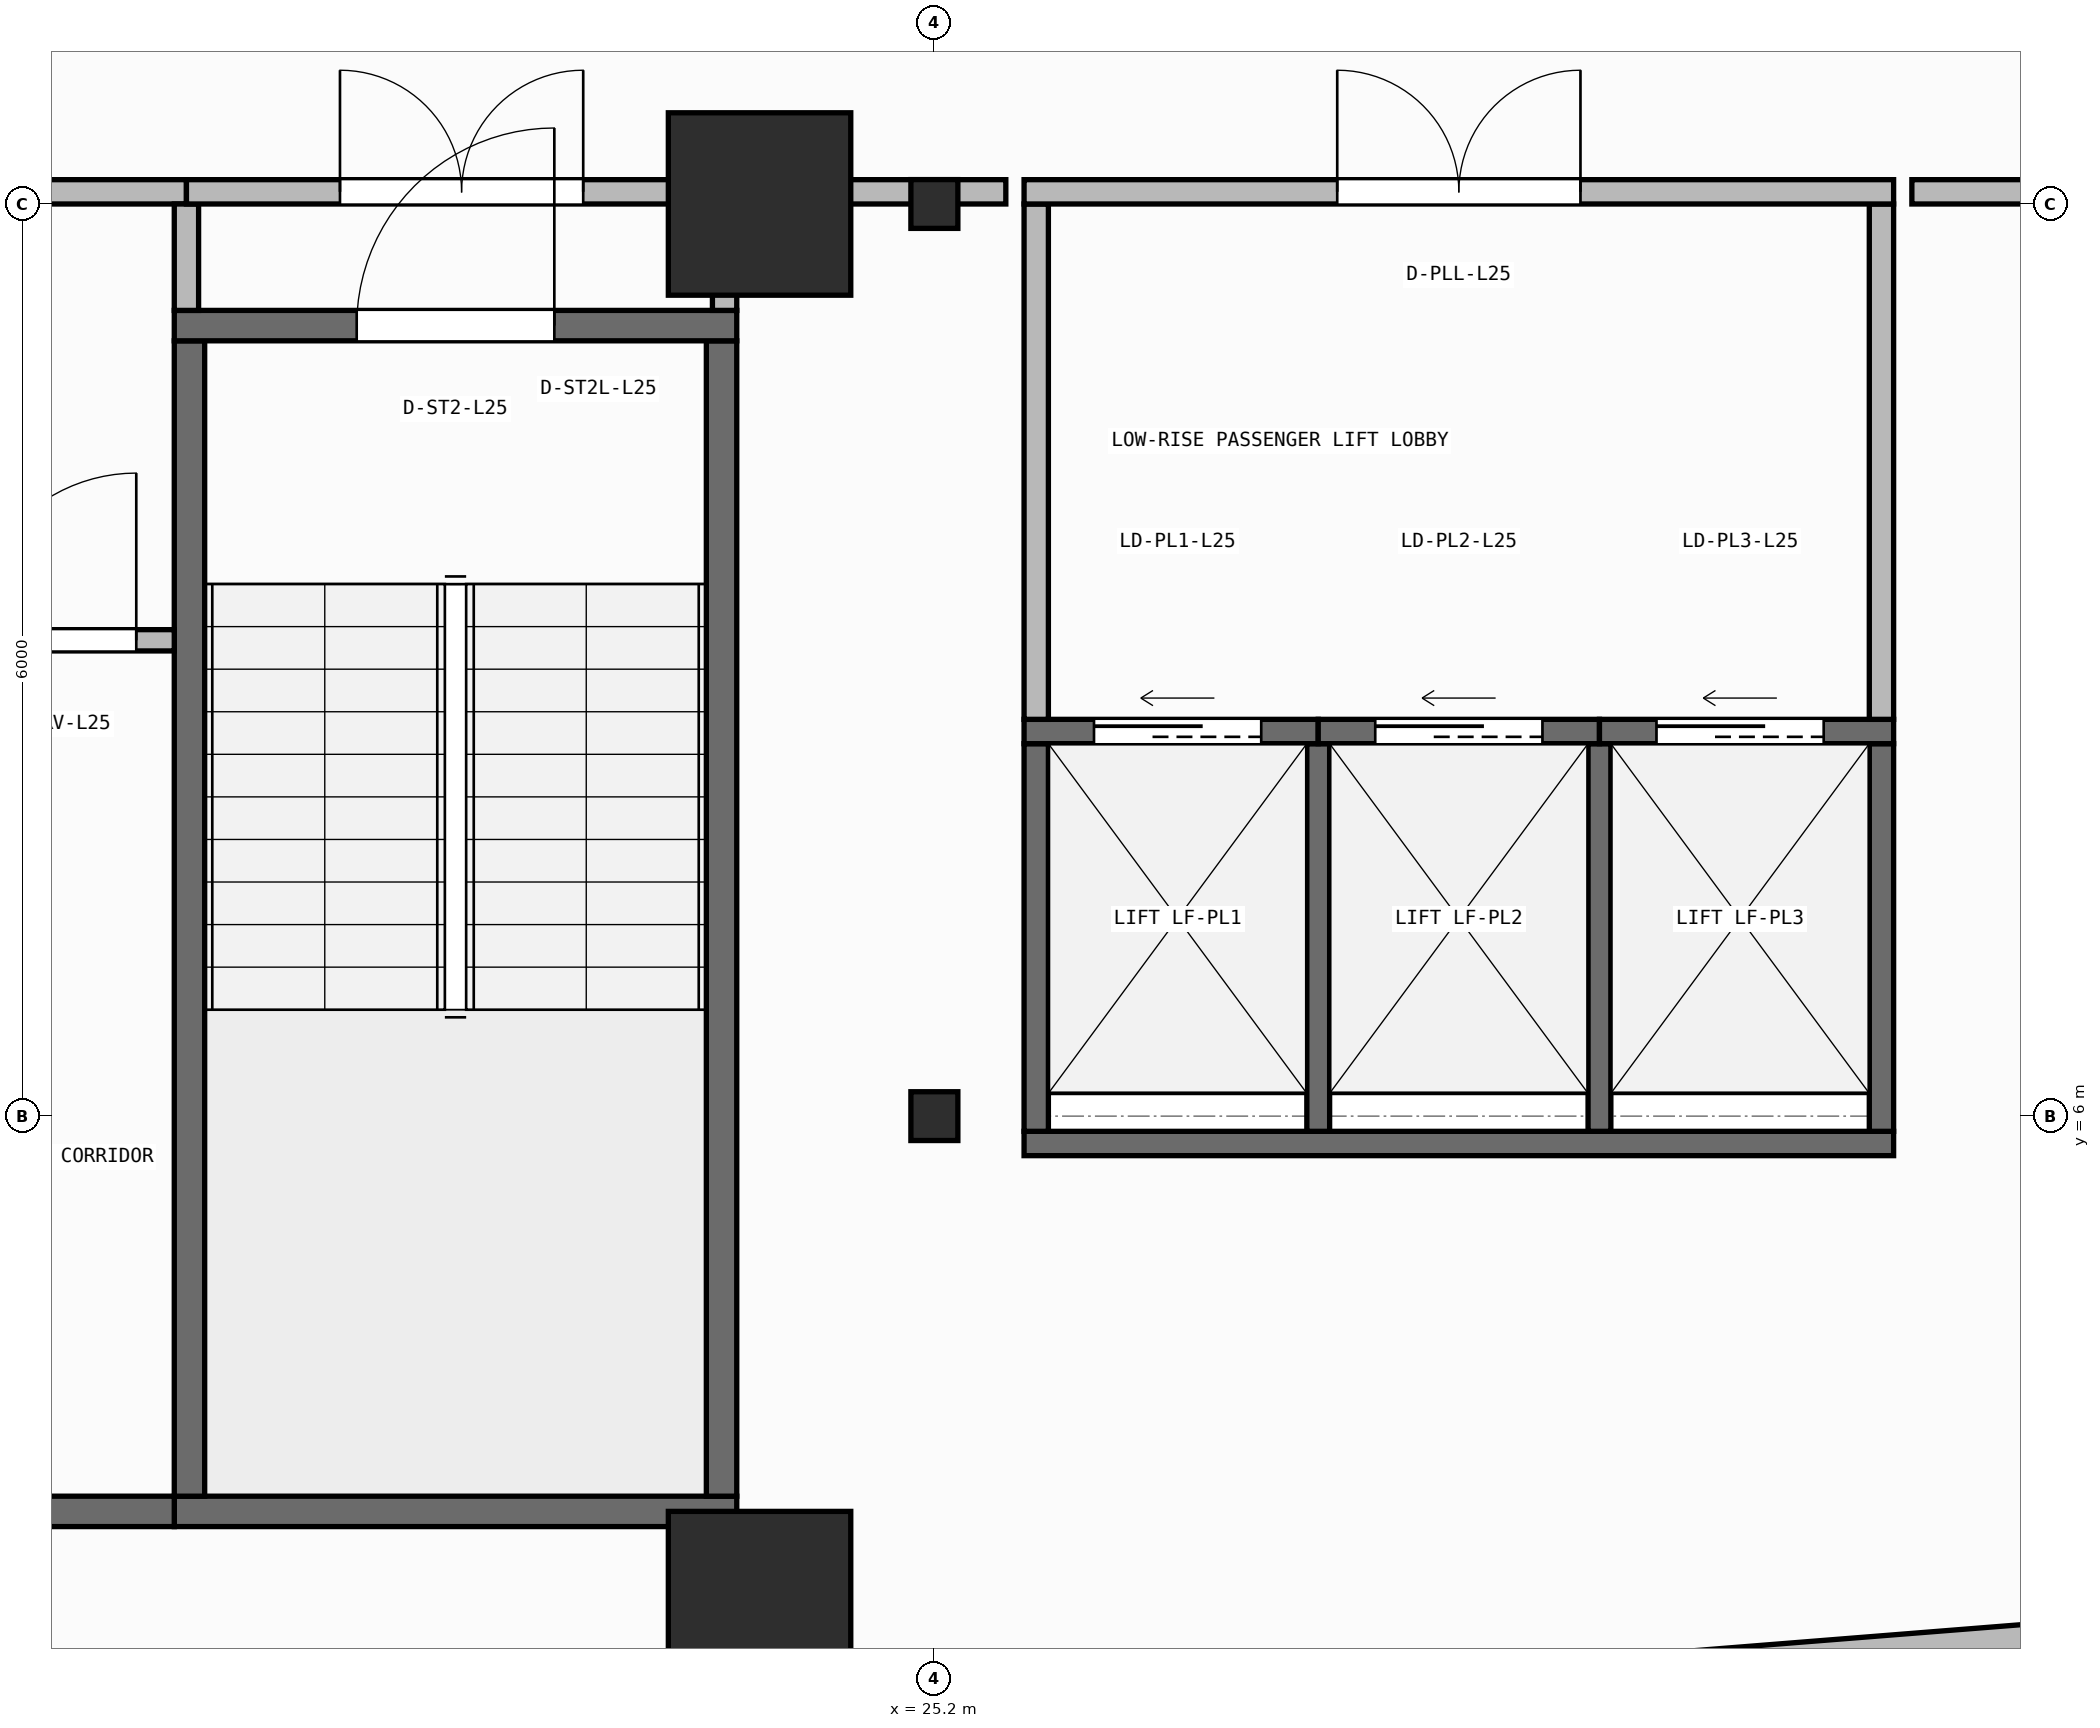
"""IFC4 building model, lengths in metres.
Left out: names, types, materials, properties, quantities, classifications, styles, units other than length and angle.
Written with IfcOpenShell. Run it as: python <this file> out.ifc"""

import sys

from ifc_helpers import new_model, si_unit, direction, frame, frame_2d, origin, origin_2d, place, context, subcontext, project, spatial, rectangle, i_section, extrude, element, fill, save


model = new_model("IFC4")
c1 = context("Model", 3, precision=1e-05, world=origin(), true_north=direction((0.0, 1.0)))
c2 = subcontext(c1, "Body", "Model", "MODEL_VIEW")
j1 = project(units=[si_unit("LENGTHUNIT", "METRE"), si_unit("PLANEANGLEUNIT", "RADIAN")], contexts=[c1])
p1 = place(None, origin())
s1 = spatial("IfcSite", under=j1, at=p1, CompositionType="ELEMENT")
p2 = place(p1, origin())
s2 = spatial("IfcBuilding", under=s1, at=p2, CompositionType="ELEMENT")
p3 = place(p2, frame((0.0, 0.0, 97.55)))
s3 = spatial("IfcBuildingStorey", under=s2, at=p3, CompositionType="ELEMENT", Elevation=97.55)
p4 = place(p3, frame((24.05, 2.8, 0.0), z_axis=(0.0, 0.0, 1.0), x_axis=(1.0, 0.0, 0.0)))
e1 = element("IfcColumn", 1, at=p4, inside=s3, PredefinedType="COLUMN", context=c2, shape_type="SweptSolid", body=[
    extrude(rectangle(XDim=1.4, YDim=1.4, at=origin_2d()), origin(), (0.0, 0.0, 1.0), 5.8),
])
p5 = place(p3, frame((25.2, 6.0, 0.0), z_axis=(0.0, 0.0, 1.0), x_axis=(1.0, 0.0, 0.0)))
e2 = element("IfcColumn", 2, at=p5, inside=s3, PredefinedType="COLUMN", context=c2, shape_type="SweptSolid", body=[
    extrude(i_section(OverallWidth=0.311, OverallDepth=0.327, WebThickness=0.016, FlangeThickness=0.025, FilletRadius=0.017, at=origin_2d()), origin(), (0.0, 0.0, 1.0), 5.8),
])
p6 = place(p3, frame((24.05, 12.0, 0.0), z_axis=(0.0, 0.0, 1.0), x_axis=(1.0, 0.0, 0.0)))
e3 = element("IfcColumn", 3, at=p6, inside=s3, PredefinedType="COLUMN", context=c2, shape_type="SweptSolid", body=[
    extrude(rectangle(XDim=1.4, YDim=1.4, at=origin_2d()), origin(), (0.0, 0.0, 1.0), 5.8),
])
p7 = place(p3, frame((25.2, 12.0, 0.0), z_axis=(0.0, 0.0, 1.0), x_axis=(1.0, 0.0, 0.0)))
e4 = element("IfcColumn", 4, at=p7, inside=s3, PredefinedType="COLUMN", context=c2, shape_type="SweptSolid", body=[
    extrude(i_section(OverallWidth=0.311, OverallDepth=0.327, WebThickness=0.016, FlangeThickness=0.025, FilletRadius=0.017, at=origin_2d()), origin(), (0.0, 0.0, 1.0), 5.8),
])
p8 = place(p3, frame((20.2, 3.4, 0.0), z_axis=(0.0, 0.0, 1.0), x_axis=(1.0, 0.0, 0.0)))
e5 = element("IfcWall", 5, at=p8, inside=s3, PredefinedType="SHEAR", context=c2, shape_type="SweptSolid", body=[
    extrude(rectangle(XDim=3.7, YDim=0.2, at=frame_2d((1.85, 0.0))), origin(), (0.0, 0.0, 1.0), 5.56),
])
for number, where, z_axis, x_axis in (
    (6, (20.3, 3.5, 0.0), (0.0, 0.0, 1.0), (0.0, 1.0, 0.0)),
    (7, (23.8, 3.5, 0.0), (0.0, 0.0, 1.0), (0.0, 1.0, 0.0)),
):
    element("IfcWall", number, at=place(p3, frame(where, z_axis=z_axis, x_axis=x_axis)), inside=s3, PredefinedType="SHEAR", context=c2, shape_type="SweptSolid", body=[
        extrude(rectangle(XDim=7.6, YDim=0.2, at=frame_2d((3.8, 0.0))), origin(), (0.0, 0.0, 1.0), 5.56),
    ])
p9 = place(p3, frame((20.2, 11.2, 0.0), z_axis=(0.0, 0.0, 1.0), x_axis=(1.0, 0.0, 0.0)))
e8 = element("IfcWall", 8, at=p9, inside=s3, PredefinedType="SHEAR", context=c2, shape_type="SweptSolid", body=[
    extrude(rectangle(XDim=3.7, YDim=0.2, at=frame_2d((1.85, 0.0))), origin(), (0.0, 0.0, 1.0), 5.56),
])
p10 = place(p9, frame((1.2, 0.0, 0.0)))
e9 = element("IfcOpeningElement", 9, at=p10, cuts=e8, PredefinedType="OPENING", context=c2, shape_type="SweptSolid", body=[
    extrude(rectangle(XDim=1.3, YDim=2.15, at=frame_2d((0.65, 1.075))), frame((0.0, 0.11, 0.0), z_axis=(0.0, -1.0, 0.0), x_axis=(1.0, 0.0, 0.0)), (0.0, 0.0, 1.0), 0.22),
])
p11 = place(p3, frame((6.5, 3.4, 0.0), z_axis=(0.0, 0.0, 1.0), x_axis=(1.0, 0.0, 0.0)))
e10 = element("IfcWall", 10, at=p11, inside=s3, PredefinedType="SHEAR", context=c2, shape_type="SweptSolid", body=[
    extrude(rectangle(XDim=13.7, YDim=0.2, at=frame_2d((6.85, 0.0))), origin(), (0.0, 0.0, 1.0), 5.56),
])
p12 = place(p3, frame((25.79, 5.82, 0.0), z_axis=(0.0, 0.0, 1.0), x_axis=(1.0, 0.0, 0.0)))
e11 = element("IfcWall", 11, at=p12, inside=s3, PredefinedType="SHEAR", context=c2, shape_type="SweptSolid", body=[
    extrude(rectangle(XDim=5.72, YDim=0.16, at=frame_2d((2.86, 0.0))), origin(), (0.0, 0.0, 1.0), 5.56),
])
for number, where, z_axis, x_axis in (
    (12, (25.87, 5.9, 0.0), (0.0, 0.0, 1.0), (0.0, 1.0, 0.0)),
    (13, (31.43, 5.9, 0.0), (0.0, 0.0, 1.0), (0.0, 1.0, 0.0)),
):
    element("IfcWall", number, at=place(p3, frame(where, z_axis=z_axis, x_axis=x_axis)), inside=s3, PredefinedType="SHEAR", context=c2, shape_type="SweptSolid", body=[
        extrude(rectangle(XDim=2.55, YDim=0.16, at=frame_2d((1.275, 0.0))), origin(), (0.0, 0.0, 1.0), 5.56),
    ])
for number, where, z_axis, x_axis in (
    (14, (27.725, 5.9, 0.0), (0.0, 0.0, 1.0), (0.0, 1.0, 0.0)),
    (15, (29.575, 5.9, 0.0), (0.0, 0.0, 1.0), (0.0, 1.0, 0.0)),
):
    element("IfcWall", number, at=place(p3, frame(where, z_axis=z_axis, x_axis=x_axis)), inside=s3, PredefinedType="SHEAR", context=c2, shape_type="SweptSolid", body=[
        extrude(rectangle(XDim=2.55, YDim=0.15, at=frame_2d((1.275, 0.0))), origin(), (0.0, 0.0, 1.0), 5.56),
    ])
p13 = place(p3, frame((25.79, 8.53, 0.0), z_axis=(0.0, 0.0, 1.0), x_axis=(1.0, 0.0, 0.0)))
e16 = element("IfcWall", 16, at=p13, inside=s3, PredefinedType="SHEAR", context=c2, shape_type="SweptSolid", body=[
    extrude(rectangle(XDim=1.935, YDim=0.16, at=frame_2d((0.968, 0.0))), origin(), (0.0, 0.0, 1.0), 5.56),
])
p14 = place(p13, frame((0.46, 0.0, 0.0)))
e17 = element("IfcOpeningElement", 17, at=p14, cuts=e16, PredefinedType="OPENING", context=c2, shape_type="SweptSolid", body=[
    extrude(rectangle(XDim=1.1, YDim=2.15, at=frame_2d((0.55, 1.075))), frame((0.0, 0.09, 0.0), z_axis=(0.0, -1.0, 0.0), x_axis=(1.0, 0.0, 0.0)), (0.0, 0.0, 1.0), 0.18),
])
p15 = place(p3, frame((27.725, 8.53, 0.0), z_axis=(0.0, 0.0, 1.0), x_axis=(1.0, 0.0, 0.0)))
e18 = element("IfcWall", 18, at=p15, inside=s3, PredefinedType="SHEAR", context=c2, shape_type="SweptSolid", body=[
    extrude(rectangle(XDim=1.85, YDim=0.16, at=frame_2d((0.925, 0.0))), origin(), (0.0, 0.0, 1.0), 5.56),
])
p16 = place(p15, frame((0.375, 0.0, 0.0)))
e19 = element("IfcOpeningElement", 19, at=p16, cuts=e18, PredefinedType="OPENING", context=c2, shape_type="SweptSolid", body=[
    extrude(rectangle(XDim=1.1, YDim=2.15, at=frame_2d((0.55, 1.075))), frame((0.0, 0.09, 0.0), z_axis=(0.0, -1.0, 0.0), x_axis=(1.0, 0.0, 0.0)), (0.0, 0.0, 1.0), 0.18),
])
p17 = place(p3, frame((29.575, 8.53, 0.0), z_axis=(0.0, 0.0, 1.0), x_axis=(1.0, 0.0, 0.0)))
e20 = element("IfcWall", 20, at=p17, inside=s3, PredefinedType="SHEAR", context=c2, shape_type="SweptSolid", body=[
    extrude(rectangle(XDim=1.935, YDim=0.16, at=frame_2d((0.968, 0.0))), origin(), (0.0, 0.0, 1.0), 5.56),
])
p18 = place(p17, frame((0.375, 0.0, 0.0)))
e21 = element("IfcOpeningElement", 21, at=p18, cuts=e20, PredefinedType="OPENING", context=c2, shape_type="SweptSolid", body=[
    extrude(rectangle(XDim=1.1, YDim=2.15, at=frame_2d((0.55, 1.075))), frame((0.0, 0.09, 0.0), z_axis=(0.0, -1.0, 0.0), x_axis=(1.0, 0.0, 0.0)), (0.0, 0.0, 1.0), 0.18),
])
p19 = place(p3, frame((18.61, 9.13, 0.0), z_axis=(0.0, 0.0, 1.0), x_axis=(1.0, 0.0, 0.0)))
e22 = element("IfcWall", 22, at=p19, inside=s3, PredefinedType="PARTITIONING", context=c2, shape_type="SweptSolid", body=[
    extrude(rectangle(XDim=1.59, YDim=0.14, at=frame_2d((0.795, 0.0))), origin(), (0.0, 0.0, 1.0), 5.56),
])
p20 = place(p19, frame((0.24, 0.0, 0.0)))
e23 = element("IfcOpeningElement", 23, at=p20, cuts=e22, PredefinedType="OPENING", context=c2, shape_type="SweptSolid", body=[
    extrude(rectangle(XDim=1.1, YDim=2.1, at=frame_2d((0.55, 1.05))), frame((0.0, 0.08, 0.0), z_axis=(0.0, -1.0, 0.0), x_axis=(1.0, 0.0, 0.0)), (0.0, 0.0, 1.0), 0.16),
])
p21 = place(p3, frame((12.58, 12.08, 0.0), z_axis=(0.0, 0.0, 1.0), x_axis=(1.0, 0.0, 0.0)))
e24 = element("IfcWall", 24, at=p21, inside=s3, PredefinedType="PARTITIONING", context=c2, shape_type="SweptSolid", body=[
    extrude(rectangle(XDim=7.7, YDim=0.16, at=frame_2d((3.85, 0.0))), origin(), (0.0, 0.0, 1.0), 4.835),
])
p22 = place(p21, frame((3.05, 0.0, 0.0)))
e25 = element("IfcOpeningElement", 25, at=p22, cuts=e24, PredefinedType="OPENING", context=c2, shape_type="SweptSolid", body=[
    extrude(rectangle(XDim=1.6, YDim=2.05, at=frame_2d((0.8, 1.025))), frame((0.0, 0.09, 0.0), z_axis=(0.0, -1.0, 0.0), x_axis=(1.0, 0.0, 0.0)), (0.0, 0.0, 1.0), 0.18),
])
p23 = place(p3, frame((20.28, 11.3, 0.0), z_axis=(0.0, 0.0, 1.0), x_axis=(0.0, 1.0, 0.0)))
e26 = element("IfcWall", 26, at=p23, inside=s3, PredefinedType="PARTITIONING", context=c2, shape_type="SweptSolid", body=[
    extrude(rectangle(XDim=0.7, YDim=0.16, at=frame_2d((0.35, 0.0))), origin(), (0.0, 0.0, 1.0), 5.56),
])
p24 = place(p3, frame((20.28, 12.08, 0.0), z_axis=(0.0, 0.0, 1.0), x_axis=(1.0, 0.0, 0.0)))
e27 = element("IfcWall", 27, at=p24, inside=s3, PredefinedType="PARTITIONING", context=c2, shape_type="SweptSolid", body=[
    extrude(rectangle(XDim=3.62, YDim=0.16, at=frame_2d((1.81, 0.0))), origin(), (0.0, 0.0, 1.0), 4.835),
])
p25 = place(p24, frame((1.01, 0.0, 0.0)))
e28 = element("IfcOpeningElement", 28, at=p25, cuts=e27, PredefinedType="OPENING", context=c2, shape_type="SweptSolid", body=[
    extrude(rectangle(XDim=1.6, YDim=2.05, at=frame_2d((0.8, 1.025))), frame((0.0, 0.09, 0.0), z_axis=(0.0, -1.0, 0.0), x_axis=(1.0, 0.0, 0.0)), (0.0, 0.0, 1.0), 0.18),
])
p26 = place(p3, frame((23.82, 11.3, 0.0), z_axis=(0.0, 0.0, 1.0), x_axis=(0.0, 1.0, 0.0)))
e29 = element("IfcWall", 29, at=p26, inside=s3, PredefinedType="PARTITIONING", context=c2, shape_type="SweptSolid", body=[
    extrude(rectangle(XDim=0.7, YDim=0.16, at=frame_2d((0.35, 0.0))), origin(), (0.0, 0.0, 1.0), 5.56),
])
for number, where, z_axis, x_axis in (
    (30, (25.87, 8.61, 0.0), (0.0, 0.0, 1.0), (0.0, 1.0, 0.0)),
    (31, (31.43, 8.61, 0.0), (0.0, 0.0, 1.0), (0.0, 1.0, 0.0)),
):
    element("IfcWall", number, at=place(p3, frame(where, z_axis=z_axis, x_axis=x_axis)), inside=s3, PredefinedType="PARTITIONING", context=c2, shape_type="SweptSolid", body=[
        extrude(rectangle(XDim=3.39, YDim=0.16, at=frame_2d((1.695, 0.0))), origin(), (0.0, 0.0, 1.0), 5.56),
    ])
p27 = place(p3, frame((25.79, 12.08, 0.0), z_axis=(0.0, 0.0, 1.0), x_axis=(1.0, 0.0, 0.0)))
e32 = element("IfcWall", 32, at=p27, inside=s3, PredefinedType="PARTITIONING", context=c2, shape_type="SweptSolid", body=[
    extrude(rectangle(XDim=5.72, YDim=0.16, at=frame_2d((2.86, 0.0))), origin(), (0.0, 0.0, 1.0), 4.835),
])
p28 = place(p27, frame((2.06, 0.0, 0.0)))
e33 = element("IfcOpeningElement", 33, at=p28, cuts=e32, PredefinedType="OPENING", context=c2, shape_type="SweptSolid", body=[
    extrude(rectangle(XDim=1.6, YDim=2.05, at=frame_2d((0.8, 1.025))), frame((0.0, 0.09, 0.0), z_axis=(0.0, -1.0, 0.0), x_axis=(1.0, 0.0, 0.0)), (0.0, 0.0, 1.0), 0.18),
])
p29 = place(p3, frame((23.92, 12.08, 0.0), z_axis=(0.0, 0.0, 1.0), x_axis=(1.0, 0.0, 0.0)))
e34 = element("IfcWall", 34, at=p29, inside=s3, PredefinedType="PARTITIONING", context=c2, shape_type="SweptSolid", body=[
    extrude(rectangle(XDim=1.86, YDim=0.16, at=frame_2d((0.93, 0.0))), origin(), (0.0, 0.0, 1.0), 4.835),
])
p30 = place(p3, frame((31.52, 12.08, 0.0), z_axis=(0.0, 0.0, 1.0), x_axis=(1.0, 0.0, 0.0)))
e35 = element("IfcWall", 35, at=p30, inside=s3, PredefinedType="PARTITIONING", context=c2, shape_type="SweptSolid", body=[
    extrude(rectangle(XDim=11.36, YDim=0.16, at=frame_2d((5.68, 0.0))), origin(), (0.0, 0.0, 1.0), 4.835),
])
p31 = place(p10, origin())
e36 = element("IfcDoor", 36, at=p31, inside=s3, OperationType="SINGLE_SWING_LEFT", PredefinedType="DOOR", context=c2, shape_type="SweptSolid", body=[
    extrude(rectangle(XDim=1.3, YDim=2.15, at=frame_2d((0.65, 1.075))), frame((0.0, 0.025, 0.0), z_axis=(0.0, -1.0, 0.0), x_axis=(1.0, 0.0, 0.0)), (0.0, 0.0, 1.0), 0.05),
])
fill(e9, e36)
p32 = place(p14, origin())
e37 = element("IfcDoor", 37, at=p32, inside=s3, OperationType="SLIDING_TO_LEFT", PredefinedType="DOOR", context=c2, shape_type="SweptSolid", body=[
    extrude(rectangle(XDim=1.1, YDim=2.15, at=frame_2d((0.55, 1.075))), frame((0.0, 0.025, 0.0), z_axis=(0.0, -1.0, 0.0), x_axis=(1.0, 0.0, 0.0)), (0.0, 0.0, 1.0), 0.05),
])
fill(e17, e37)
p33 = place(p16, origin())
e38 = element("IfcDoor", 38, at=p33, inside=s3, OperationType="SLIDING_TO_LEFT", PredefinedType="DOOR", context=c2, shape_type="SweptSolid", body=[
    extrude(rectangle(XDim=1.1, YDim=2.15, at=frame_2d((0.55, 1.075))), frame((0.0, 0.025, 0.0), z_axis=(0.0, -1.0, 0.0), x_axis=(1.0, 0.0, 0.0)), (0.0, 0.0, 1.0), 0.05),
])
fill(e19, e38)
p34 = place(p18, origin())
e39 = element("IfcDoor", 39, at=p34, inside=s3, OperationType="SLIDING_TO_LEFT", PredefinedType="DOOR", context=c2, shape_type="SweptSolid", body=[
    extrude(rectangle(XDim=1.1, YDim=2.15, at=frame_2d((0.55, 1.075))), frame((0.0, 0.025, 0.0), z_axis=(0.0, -1.0, 0.0), x_axis=(1.0, 0.0, 0.0)), (0.0, 0.0, 1.0), 0.05),
])
fill(e21, e39)
p35 = place(p20, origin())
e40 = element("IfcDoor", 40, at=p35, inside=s3, OperationType="SINGLE_SWING_LEFT", PredefinedType="DOOR", context=c2, shape_type="SweptSolid", body=[
    extrude(rectangle(XDim=1.1, YDim=2.1, at=frame_2d((0.55, 1.05))), frame((0.0, 0.025, 0.0), z_axis=(0.0, -1.0, 0.0), x_axis=(1.0, 0.0, 0.0)), (0.0, 0.0, 1.0), 0.05),
])
fill(e23, e40)
p36 = place(p25, origin())
e41 = element("IfcDoor", 41, at=p36, inside=s3, OperationType="DOUBLE_DOOR_SINGLE_SWING", PredefinedType="DOOR", context=c2, shape_type="SweptSolid", body=[
    extrude(rectangle(XDim=1.6, YDim=2.05, at=frame_2d((0.8, 1.025))), frame((0.0, 0.025, 0.0), z_axis=(0.0, -1.0, 0.0), x_axis=(1.0, 0.0, 0.0)), (0.0, 0.0, 1.0), 0.05),
])
fill(e28, e41)
p37 = place(p28, origin())
e42 = element("IfcDoor", 42, at=p37, inside=s3, OperationType="DOUBLE_DOOR_SINGLE_SWING", PredefinedType="DOOR", context=c2, shape_type="SweptSolid", body=[
    extrude(rectangle(XDim=1.6, YDim=2.05, at=frame_2d((0.8, 1.025))), frame((0.0, 0.025, 0.0), z_axis=(0.0, -1.0, 0.0), x_axis=(1.0, 0.0, 0.0)), (0.0, 0.0, 1.0), 0.05),
])
fill(e33, e42)
save(model, sys.argv[1])
